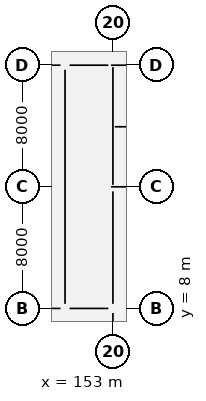
"""IFC4 building model, lengths in metres.
Left out: names, types, materials, properties, quantities, classifications, styles, units other than length and angle.
Written with IfcOpenShell. Run it as: python <this file> out.ifc"""

import sys

from ifc_helpers import new_model, si_unit, direction, frame, frame_2d, origin, origin_2d, place, context, subcontext, project, spatial, rectangle, extrude, element, fill, save


model = new_model("IFC4")
c1 = context("Model", 3, precision=1e-05, world=origin(), true_north=direction((0.0, 1.0)))
c2 = subcontext(c1, "Body", "Model", "MODEL_VIEW")
j1 = project(units=[si_unit("LENGTHUNIT", "METRE"), si_unit("PLANEANGLEUNIT", "RADIAN")], contexts=[c1])
p1 = place(None, origin())
s1 = spatial("IfcSite", under=j1, at=p1, CompositionType="ELEMENT")
p2 = place(p1, origin())
s2 = spatial("IfcBuilding", under=s1, at=p2, CompositionType="ELEMENT")
p3 = place(p2, origin())
s3 = spatial("IfcBuildingStorey", under=s2, at=p3, CompositionType="ELEMENT", Elevation=0.0)
for number, where, z_axis, x_axis in (
    (1, (153.0, 8.0, -0.5), (0.0, 0.0, 1.0), (1.0, 0.0, 0.0)),
    (2, (153.0, 16.0, -0.5), (0.0, 0.0, 1.0), (1.0, 0.0, 0.0)),
    (3, (153.0, 24.0, -0.5), (0.0, 0.0, 1.0), (1.0, 0.0, 0.0)),
):
    element("IfcColumn", number, at=place(p3, frame(where, z_axis=z_axis, x_axis=x_axis)), inside=s3, PredefinedType="COLUMN", context=c2, shape_type="SweptSolid", body=[
        extrude(rectangle(XDim=0.7, YDim=0.7, at=origin_2d()), origin(), (0.0, 0.0, 1.0), 6.8),
    ])
p4 = place(p3, frame((162.125, 16.0, -0.5), z_axis=(0.0, 0.0, 1.0), x_axis=(-1.0, 0.0, 0.0)))
e4 = element("IfcWall", 4, at=p4, inside=s3, PredefinedType="SOLIDWALL", context=c2, shape_type="SweptSolid", body=[
    extrude(rectangle(XDim=9.25, YDim=0.25, at=frame_2d((4.625, 0.0))), origin(), (0.0, 0.0, 1.0), 6.8),
])
p5 = place(p4, frame((7.425, 0.0, 0.5)))
e5 = element("IfcOpeningElement", 5, at=p5, cuts=e4, PredefinedType="OPENING", context=c2, shape_type="SweptSolid", body=[
    extrude(rectangle(XDim=1.2, YDim=2.2, at=frame_2d((0.6, 1.1))), frame((0.0, 0.135, 0.0), z_axis=(0.0, -1.0, 0.0), x_axis=(1.0, 0.0, 0.0)), (0.0, 0.0, 1.0), 0.27),
])
p6 = place(p3, frame((152.875, 24.0, -0.5), z_axis=(0.0, 0.0, 1.0), x_axis=(1.0, 0.0, 0.0)))
e6 = element("IfcWall", 6, at=p6, inside=s3, PredefinedType="SOLIDWALL", context=c2, shape_type="SweptSolid", body=[
    extrude(rectangle(XDim=9.25, YDim=0.25, at=frame_2d((4.625, 0.0))), origin(), (0.0, 0.0, 1.0), 6.8),
])
p7 = place(p6, frame((5.775, 0.0, 0.5)))
e7 = element("IfcOpeningElement", 7, at=p7, cuts=e6, PredefinedType="OPENING", context=c2, shape_type="SweptSolid", body=[
    extrude(rectangle(XDim=1.6, YDim=2.2, at=frame_2d((0.8, 1.1))), frame((0.0, 0.135, 0.0), z_axis=(0.0, -1.0, 0.0), x_axis=(1.0, 0.0, 0.0)), (0.0, 0.0, 1.0), 0.27),
])
p8 = place(p3, frame((153.0, 16.125, -0.5), z_axis=(0.0, 0.0, 1.0), x_axis=(0.0, 1.0, 0.0)))
e8 = element("IfcWall", 8, at=p8, inside=s3, PredefinedType="SOLIDWALL", context=c2, shape_type="SweptSolid", body=[
    extrude(rectangle(XDim=7.75, YDim=0.25, at=frame_2d((3.875, 0.0))), origin(), (0.0, 0.0, 1.0), 6.8),
])
p9 = place(p8, frame((1.15, 0.0, 0.5)))
e9 = element("IfcOpeningElement", 9, at=p9, cuts=e8, PredefinedType="OPENING", context=c2, shape_type="SweptSolid", body=[
    extrude(rectangle(XDim=1.2, YDim=2.2, at=frame_2d((0.6, 1.1))), frame((0.0, 0.135, 0.0), z_axis=(0.0, -1.0, 0.0), x_axis=(1.0, 0.0, 0.0)), (0.0, 0.0, 1.0), 0.27),
])
p10 = place(p3, frame((153.125, 19.95, -0.5), z_axis=(0.0, 0.0, 1.0), x_axis=(1.0, 0.0, 0.0)))
e10 = element("IfcWall", 10, at=p10, inside=s3, PredefinedType="SOLIDWALL", context=c2, shape_type="SweptSolid", body=[
    extrude(rectangle(XDim=8.75, YDim=0.25, at=frame_2d((4.375, 0.0))), origin(), (0.0, 0.0, 1.0), 6.8),
])
p11 = place(p3, frame((153.0, 0.45, 0.0), z_axis=(0.0, 0.0, 1.0), x_axis=(0.0, 1.0, 0.0)))
e11 = element("IfcWall", 11, at=p11, inside=s3, PredefinedType="PARTITIONING", context=c2, shape_type="SweptSolid", body=[
    extrude(rectangle(XDim=7.25, YDim=0.1, at=frame_2d((3.625, 0.0))), origin(), (0.0, 0.0, 1.0), 5.35),
])
p12 = place(p11, frame((3.085, 0.0, 0.0)))
e12 = element("IfcOpeningElement", 12, at=p12, cuts=e11, PredefinedType="OPENING", context=c2, shape_type="SweptSolid", body=[
    extrude(rectangle(XDim=1.08, YDim=2.15, at=frame_2d((0.54, 1.075))), frame((0.0, 0.06, 0.0), z_axis=(0.0, -1.0, 0.0), x_axis=(1.0, 0.0, 0.0)), (0.0, 0.0, 1.0), 0.12),
])
p13 = place(p3, frame((150.15, 8.0, 0.0), z_axis=(0.0, 0.0, 1.0), x_axis=(1.0, 0.0, 0.0)))
e13 = element("IfcWall", 13, at=p13, inside=s3, PredefinedType="PARTITIONING", context=c2, shape_type="SweptSolid", body=[
    extrude(rectangle(XDim=2.55, YDim=0.14, at=frame_2d((1.275, 0.0))), origin(), (0.0, 0.0, 1.0), 5.25),
])
p14 = place(p13, frame((0.805, 0.0, 0.0)))
e14 = element("IfcOpeningElement", 14, at=p14, cuts=e13, PredefinedType="OPENING", context=c2, shape_type="SweptSolid", body=[
    extrude(rectangle(XDim=0.94, YDim=2.14, at=frame_2d((0.47, 1.07))), frame((0.0, 0.08, 0.0), z_axis=(0.0, -1.0, 0.0), x_axis=(1.0, 0.0, 0.0)), (0.0, 0.0, 1.0), 0.16),
])
p15 = place(p3, frame((144.75, 8.0, 0.0), z_axis=(0.0, 0.0, 1.0), x_axis=(1.0, 0.0, 0.0)))
e15 = element("IfcWall", 15, at=p15, inside=s3, PredefinedType="PARTITIONING", context=c2, shape_type="SweptSolid", body=[
    extrude(rectangle(XDim=4.8, YDim=0.125, at=frame_2d((2.4, 0.0))), origin(), (0.0, 0.0, 1.0), 5.25),
])
p16 = place(p3, frame((153.0, 8.3, 0.0), z_axis=(0.0, 0.0, 1.0), x_axis=(0.0, 1.0, 0.0)))
e16 = element("IfcWall", 16, at=p16, inside=s3, PredefinedType="PARTITIONING", context=c2, shape_type="SweptSolid", body=[
    extrude(rectangle(XDim=7.4, YDim=0.1, at=frame_2d((3.7, 0.0))), origin(), (0.0, 0.0, 1.0), 5.35),
])
p17 = place(p16, frame((2.83, 0.0, 0.0)))
e17 = element("IfcOpeningElement", 17, at=p17, cuts=e16, PredefinedType="OPENING", context=c2, shape_type="SweptSolid", body=[
    extrude(rectangle(XDim=1.74, YDim=2.28, at=frame_2d((0.87, 1.14))), frame((0.0, 0.06, 0.0), z_axis=(0.0, -1.0, 0.0), x_axis=(1.0, 0.0, 0.0)), (0.0, 0.0, 1.0), 0.12),
])
p18 = place(p3, frame((150.15, 24.0, 0.0), z_axis=(0.0, 0.0, 1.0), x_axis=(1.0, 0.0, 0.0)))
e18 = element("IfcWall", 18, at=p18, inside=s3, PredefinedType="PARTITIONING", context=c2, shape_type="SweptSolid", body=[
    extrude(rectangle(XDim=2.55, YDim=0.11, at=frame_2d((1.275, 0.0))), origin(), (0.0, 0.0, 1.0), 5.1),
])
p19 = place(p18, frame((0.805, 0.0, 0.0)))
e19 = element("IfcOpeningElement", 19, at=p19, cuts=e18, PredefinedType="OPENING", context=c2, shape_type="SweptSolid", body=[
    extrude(rectangle(XDim=0.94, YDim=2.14, at=frame_2d((0.47, 1.07))), frame((0.0, 0.065, 0.0), z_axis=(0.0, -1.0, 0.0), x_axis=(1.0, 0.0, 0.0)), (0.0, 0.0, 1.0), 0.13),
])
p20 = place(p3, frame((144.75, 24.0, 0.0), z_axis=(0.0, 0.0, 1.0), x_axis=(1.0, 0.0, 0.0)))
e20 = element("IfcWall", 20, at=p20, inside=s3, PredefinedType="PARTITIONING", context=c2, shape_type="SweptSolid", body=[
    extrude(rectangle(XDim=4.8, YDim=0.1, at=frame_2d((2.4, 0.0))), origin(), (0.0, 0.0, 1.0), 5.1),
])
p21 = place(p20, frame((1.89, 0.0, 0.0)))
e21 = element("IfcOpeningElement", 21, at=p21, cuts=e20, PredefinedType="OPENING", context=c2, shape_type="SweptSolid", body=[
    extrude(rectangle(XDim=1.02, YDim=2.18, at=frame_2d((0.51, 1.09))), frame((0.0, 0.06, 0.0), z_axis=(0.0, -1.0, 0.0), x_axis=(1.0, 0.0, 0.0)), (0.0, 0.0, 1.0), 0.12),
])
p22 = place(p3, frame((149.85, 8.3, 0.0), z_axis=(0.0, 0.0, 1.0), x_axis=(0.0, 1.0, 0.0)))
e22 = element("IfcWall", 22, at=p22, inside=s3, PredefinedType="PARTITIONING", context=c2, shape_type="SweptSolid", body=[
    extrude(rectangle(XDim=15.4, YDim=0.1, at=frame_2d((7.7, 0.0))), origin(), (0.0, 0.0, 1.0), 5.95),
])
p23 = place(p22, frame((3.31, 0.0, 0.0)))
e23 = element("IfcOpeningElement", 23, at=p23, cuts=e22, PredefinedType="OPENING", context=c2, shape_type="SweptSolid", body=[
    extrude(rectangle(XDim=1.08, YDim=2.15, at=frame_2d((0.54, 1.075))), frame((0.0, 0.06, 0.0), z_axis=(0.0, -1.0, 0.0), x_axis=(1.0, 0.0, 0.0)), (0.0, 0.0, 1.0), 0.12),
])
p24 = place(p9, origin())
e24 = element("IfcDoor", 24, at=p24, inside=s3, OperationType="SINGLE_SWING_LEFT", PredefinedType="DOOR", context=c2, shape_type="SweptSolid", body=[
    extrude(rectangle(XDim=1.2, YDim=2.2, at=frame_2d((0.6, 1.1))), frame((0.0, 0.025, 0.0), z_axis=(0.0, -1.0, 0.0), x_axis=(1.0, 0.0, 0.0)), (0.0, 0.0, 1.0), 0.05),
])
fill(e9, e24)
p25 = place(p14, origin())
e25 = element("IfcDoor", 25, at=p25, inside=s3, OperationType="SINGLE_SWING_RIGHT", PredefinedType="DOOR", context=c2, shape_type="SweptSolid", body=[
    extrude(rectangle(XDim=0.94, YDim=2.14, at=frame_2d((0.47, 1.07))), frame((0.0, 0.025, 0.0), z_axis=(0.0, -1.0, 0.0), x_axis=(1.0, 0.0, 0.0)), (0.0, 0.0, 1.0), 0.05),
])
fill(e14, e25)
p26 = place(p17, origin())
e26 = element("IfcDoor", 26, at=p26, inside=s3, OperationType="DOUBLE_DOOR_SINGLE_SWING", PredefinedType="DOOR", context=c2, shape_type="SweptSolid", body=[
    extrude(rectangle(XDim=1.74, YDim=2.28, at=frame_2d((0.87, 1.14))), frame((0.0, 0.025, 0.0), z_axis=(0.0, -1.0, 0.0), x_axis=(1.0, 0.0, 0.0)), (0.0, 0.0, 1.0), 0.05),
])
fill(e17, e26)
p27 = place(p19, origin())
e27 = element("IfcDoor", 27, at=p27, inside=s3, OperationType="SINGLE_SWING_LEFT", PredefinedType="DOOR", context=c2, shape_type="SweptSolid", body=[
    extrude(rectangle(XDim=0.94, YDim=2.14, at=frame_2d((0.47, 1.07))), frame((0.0, 0.025, 0.0), z_axis=(0.0, -1.0, 0.0), x_axis=(1.0, 0.0, 0.0)), (0.0, 0.0, 1.0), 0.05),
])
fill(e19, e27)
p28 = place(p23, origin())
e28 = element("IfcDoor", 28, at=p28, inside=s3, OperationType="SINGLE_SWING_RIGHT", PredefinedType="DOOR", context=c2, shape_type="SweptSolid", body=[
    extrude(rectangle(XDim=1.08, YDim=2.15, at=frame_2d((0.54, 1.075))), frame((0.0, 0.025, 0.0), z_axis=(0.0, -1.0, 0.0), x_axis=(1.0, 0.0, 0.0)), (0.0, 0.0, 1.0), 0.05),
])
fill(e23, e28)
p29 = place(p5, origin())
e29 = element("IfcDoor", 29, at=p29, inside=s3, OperationType="SINGLE_SWING_RIGHT", PredefinedType="DOOR", context=c2, shape_type="SweptSolid", body=[
    extrude(rectangle(XDim=1.2, YDim=2.2, at=frame_2d((0.6, 1.1))), frame((0.0, 0.025, 0.0), z_axis=(0.0, -1.0, 0.0), x_axis=(1.0, 0.0, 0.0)), (0.0, 0.0, 1.0), 0.05),
])
fill(e5, e29)
save(model, sys.argv[1])
